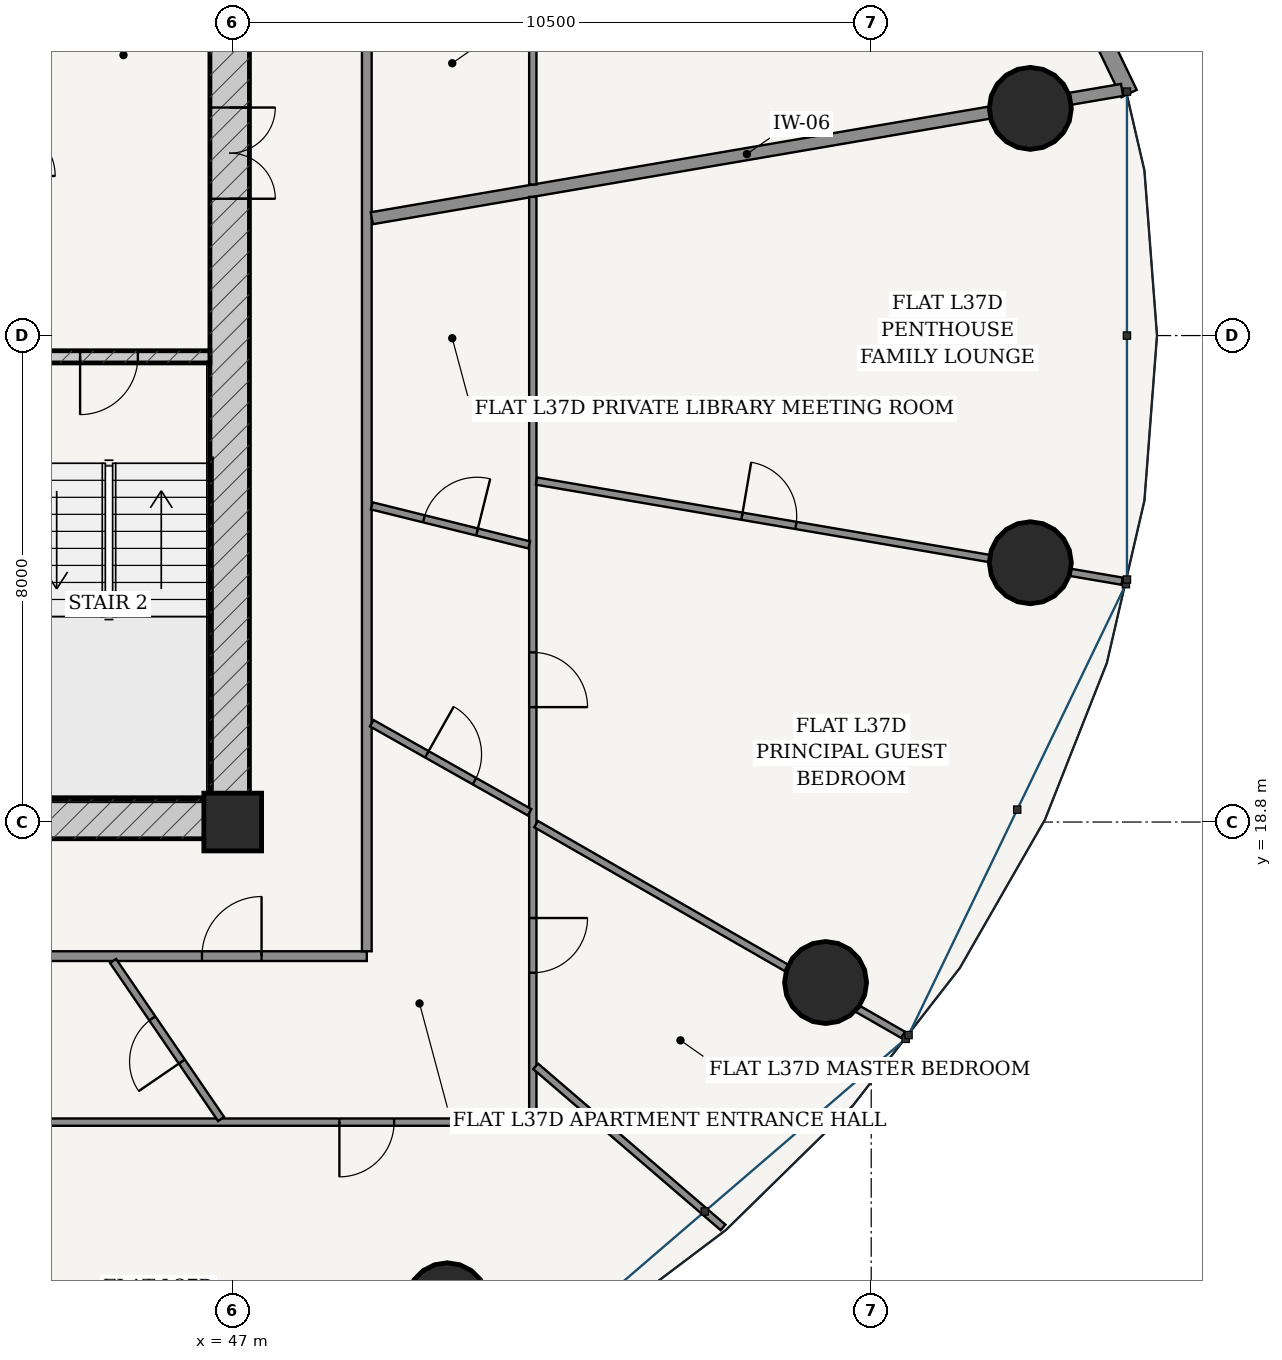
"""IFC4 building model, lengths in metres.
Left out: names, types, materials, properties, quantities, classifications, styles, units other than length and angle.
Written with IfcOpenShell. Run it as: python <this file> out.ifc"""

import sys

from ifc_helpers import new_model, si_unit, direction, frame, frame_2d, origin, origin_2d, place, context, subcontext, project, spatial, rectangle, hollow_circle, extrude, source, transform, mapped, element, fill, save


model = new_model("IFC4")
c1 = context("Model", 3, precision=1e-05, world=origin(), true_north=direction((-0.2419218956, 0.970295726276)))
c2 = subcontext(c1, "Body", "Model", "MODEL_VIEW")
j1 = project(units=[si_unit("LENGTHUNIT", "METRE"), si_unit("PLANEANGLEUNIT", "RADIAN")], contexts=[c1])
p1 = place(None, origin())
s1 = spatial("IfcSite", under=j1, at=p1, CompositionType="ELEMENT")
p2 = place(p1, origin())
s2 = spatial("IfcBuilding", under=s1, at=p2, CompositionType="ELEMENT")
p3 = place(p2, frame((0.0, 0.0, 142.6)))
s3 = spatial("IfcBuildingStorey", under=s2, at=p3, CompositionType="ELEMENT", Elevation=142.6)
p4 = place(p3, frame((47.0, 18.8, 0.0), z_axis=(0.0, 0.0, 1.0), x_axis=(1.0, 0.0, 0.0)))
e1 = element("IfcColumn", 1, at=p4, inside=s3, PredefinedType="COLUMN", context=c2, shape_type="SweptSolid", body=[
    extrude(rectangle(XDim=0.95, YDim=0.95, at=origin_2d()), origin(), (0.0, 0.0, 1.0), 3.6),
])
p5 = place(p3, frame((28.725, 18.85, 0.0), z_axis=(0.0, 0.0, 1.0), x_axis=(1.0, 0.0, 0.0)))
e2 = element("IfcWall", 2, at=p5, inside=s3, PredefinedType="SHEAR", context=c2, shape_type="SweptSolid", body=[
    extrude(rectangle(XDim=18.55, YDim=0.65, at=frame_2d((9.275, 0.0))), origin(), (0.0, 0.0, 1.0), 3.33),
])
p6 = place(p5, frame((6.81, 0.0, 0.0)))
e3 = element("IfcOpeningElement", 3, at=p6, cuts=e2, PredefinedType="OPENING", context=c2, shape_type="SweptSolid", body=[
    extrude(rectangle(XDim=0.85, YDim=2.1, at=frame_2d((0.425, 1.05))), frame((0.0, 0.335, 0.0), z_axis=(0.0, -1.0, 0.0), x_axis=(1.0, 0.0, 0.0)), (0.0, 0.0, 1.0), 0.67),
])
p7 = place(p5, frame((8.85, 0.0, 0.0)))
e4 = element("IfcOpeningElement", 4, at=p7, cuts=e2, PredefinedType="OPENING", context=c2, shape_type="SweptSolid", body=[
    extrude(rectangle(XDim=0.85, YDim=2.1, at=frame_2d((0.425, 1.05))), frame((0.0, 0.335, 0.0), z_axis=(0.0, -1.0, 0.0), x_axis=(1.0, 0.0, 0.0)), (0.0, 0.0, 1.0), 0.67),
])
p8 = place(p5, frame((10.89, 0.0, 0.0)))
e5 = element("IfcOpeningElement", 5, at=p8, cuts=e2, PredefinedType="OPENING", context=c2, shape_type="SweptSolid", body=[
    extrude(rectangle(XDim=0.85, YDim=2.1, at=frame_2d((0.425, 1.05))), frame((0.0, 0.335, 0.0), z_axis=(0.0, -1.0, 0.0), x_axis=(1.0, 0.0, 0.0)), (0.0, 0.0, 1.0), 0.67),
])
p9 = place(p3, frame((46.95, 19.175, 0.0), z_axis=(0.0, 0.0, 1.0), x_axis=(0.0, 1.0, 0.0)))
e6 = element("IfcWall", 6, at=p9, inside=s3, PredefinedType="SHEAR", context=c2, shape_type="SweptSolid", body=[
    extrude(rectangle(XDim=15.25, YDim=0.65, at=frame_2d((7.625, 0.0))), origin(), (0.0, 0.0, 1.0), 3.33),
])
p10 = place(p9, frame((9.875, 0.0, 0.0)))
e7 = element("IfcOpeningElement", 7, at=p10, cuts=e6, PredefinedType="OPENING", context=c2, shape_type="SweptSolid", body=[
    extrude(rectangle(XDim=1.5, YDim=2.2, at=frame_2d((0.75, 1.1))), frame((0.0, 0.335, 0.0), z_axis=(0.0, -1.0, 0.0), x_axis=(1.0, 0.0, 0.0)), (0.0, 0.0, 1.0), 0.67),
])
p11 = place(p3, frame((43.305, 26.45, 0.0), z_axis=(0.0, 0.0, 1.0), x_axis=(1.0, 0.0, 0.0)))
e8 = element("IfcWall", 8, at=p11, inside=s3, PredefinedType="SOLIDWALL", context=c2, shape_type="SweptSolid", body=[
    extrude(rectangle(XDim=3.32, YDim=0.2, at=frame_2d((1.66, 0.0))), origin(), (0.0, 0.0, 1.0), 3.33),
])
p12 = place(p11, frame((1.185, 0.0, 0.0)))
e9 = element("IfcOpeningElement", 9, at=p12, cuts=e8, PredefinedType="OPENING", context=c2, shape_type="SweptSolid", body=[
    extrude(rectangle(XDim=0.95, YDim=2.15, at=frame_2d((0.475, 1.075))), frame((0.0, 0.11, 0.0), z_axis=(0.0, -1.0, 0.0), x_axis=(1.0, 0.0, 0.0)), (0.0, 0.0, 1.0), 0.22),
])
for number, where, z_axis, x_axis in (
    (10, (60.117, 30.536, 0.0), (0.0, 0.0, 1.0), (1.0, 0.0, 0.0)),
    (11, (50.528, 10.877, 0.0), (0.0, 0.0, 1.0), (1.0, 0.0, 0.0)),
    (12, (56.75, 16.161, 0.0), (0.0, 0.0, 1.0), (1.0, 0.0, 0.0)),
    (13, (60.117, 23.064, 0.0), (0.0, 0.0, 1.0), (1.0, 0.0, 0.0)),
):
    element("IfcColumn", number, at=place(p3, frame(where, z_axis=z_axis, x_axis=x_axis)), inside=s3, PredefinedType="COLUMN", context=c2, shape_type="SweptSolid", body=[
        extrude(hollow_circle(Radius=0.675, WallThickness=0.042, at=origin_2d()), origin(), (0.0, 0.0, 1.0), 3.6),
    ])
p13 = place(p3, frame((61.74, 30.78, 0.0), z_axis=(0.0, 0.0, 1.0), x_axis=(-0.434209827226, 0.900811759437, 0.0)))
e14 = element("IfcWall", 14, at=p13, inside=s3, PredefinedType="SOLIDWALL", context=c2, shape_type="SweptSolid", body=[
    extrude(rectangle(XDim=8.472, YDim=0.28, at=frame_2d((4.236, 0.0))), origin(), (0.0, 0.0, 1.0), 3.33),
])
p14 = place(p13, frame((1.237, 0.0, 0.85)))
e15 = element("IfcOpeningElement", 15, at=p14, cuts=e14, PredefinedType="OPENING", context=c2, shape_type="SweptSolid", body=[
    extrude(rectangle(XDim=2.1, YDim=1.95, at=frame_2d((1.05, 0.975))), frame((0.0, 0.15, 0.0), z_axis=(0.0, -1.0, 0.0), x_axis=(1.0, 0.0, 0.0)), (0.0, 0.0, 1.0), 0.3),
])
p15 = place(p13, frame((5.134, 0.0, 0.85)))
e16 = element("IfcOpeningElement", 16, at=p15, cuts=e14, PredefinedType="OPENING", context=c2, shape_type="SweptSolid", body=[
    extrude(rectangle(XDim=2.1, YDim=1.95, at=frame_2d((1.05, 0.975))), frame((0.0, 0.15, 0.0), z_axis=(0.0, -1.0, 0.0), x_axis=(1.0, 0.0, 0.0)), (0.0, 0.0, 1.0), 0.3),
])
p16 = place(p3, frame((34.32, 16.595, 0.0), z_axis=(0.0, 0.0, 1.0), x_axis=(1.0, 0.0, 0.0)))
e17 = element("IfcWall", 17, at=p16, inside=s3, PredefinedType="PARTITIONING", context=c2, shape_type="SweptSolid", body=[
    extrude(rectangle(XDim=14.885, YDim=0.16, at=frame_2d((7.442, 0.0))), origin(), (0.0, 0.0, 1.0), 2.776),
])
p17 = place(p16, frame((12.174, 0.0, 0.0)))
e18 = element("IfcOpeningElement", 18, at=p17, cuts=e17, PredefinedType="OPENING", context=c2, shape_type="SweptSolid", body=[
    extrude(rectangle(XDim=0.98, YDim=2.2, at=frame_2d((0.49, 1.1))), frame((0.0, 0.09, 0.0), z_axis=(0.0, -1.0, 0.0), x_axis=(1.0, 0.0, 0.0)), (0.0, 0.0, 1.0), 0.18),
])
p18 = place(p3, frame((49.205, 16.675, 0.0), z_axis=(0.0, 0.0, 1.0), x_axis=(0.0, 1.0, 0.0)))
e19 = element("IfcWall", 19, at=p18, inside=s3, PredefinedType="PARTITIONING", context=c2, shape_type="SweptSolid", body=[
    extrude(rectangle(XDim=18.4, YDim=0.16, at=frame_2d((9.2, 0.0))), origin(), (0.0, 0.0, 1.0), 2.776),
])
p19 = place(p3, frame((49.287, 28.73, 0.0), z_axis=(0.0, 0.0, 1.0), x_axis=(0.985698993845, 0.168515558725, 0.0)))
e20 = element("IfcWall", 20, at=p19, inside=s3, PredefinedType="PARTITIONING", context=c2, shape_type="SweptSolid", body=[
    extrude(rectangle(XDim=12.517, YDim=0.2, at=frame_2d((6.259, 0.0))), origin(), (0.0, 0.0, 1.0), 2.776),
])
p20 = place(p3, frame((51.935, 37.885, 0.0), z_axis=(0.0, 0.0, 1.0), x_axis=(0.0, -1.0, 0.0)))
e21 = element("IfcWall", 21, at=p20, inside=s3, PredefinedType="PARTITIONING", context=c2, shape_type="SweptSolid", body=[
    extrude(rectangle(XDim=8.601, YDim=0.12, at=frame_2d((4.3, 0.0))), origin(), (0.0, 0.0, 1.0), 2.776),
])
p21 = place(p20, frame((1.021, 0.0, 0.0)))
e22 = element("IfcOpeningElement", 22, at=p21, cuts=e21, PredefinedType="OPENING", context=c2, shape_type="SweptSolid", body=[
    extrude(rectangle(XDim=0.9, YDim=2.15, at=frame_2d((0.45, 1.075))), frame((0.0, 0.07, 0.0), z_axis=(0.0, -1.0, 0.0), x_axis=(1.0, 0.0, 0.0)), (0.0, 0.0, 1.0), 0.14),
])
p22 = place(p3, frame((51.935, 29.08, 0.0), z_axis=(0.0, 0.0, 1.0), x_axis=(0.0, -1.0, 0.0)))
e23 = element("IfcWall", 23, at=p22, inside=s3, PredefinedType="PARTITIONING", context=c2, shape_type="SweptSolid", body=[
    extrude(rectangle(XDim=15.215, YDim=0.12, at=frame_2d((7.608, 0.0))), origin(), (0.0, 0.0, 1.0), 2.776),
])
p23 = place(p22, frame((11.859, 0.0, 0.0)))
e24 = element("IfcOpeningElement", 24, at=p23, cuts=e23, PredefinedType="OPENING", context=c2, shape_type="SweptSolid", body=[
    extrude(rectangle(XDim=0.9, YDim=2.15, at=frame_2d((0.45, 1.075))), frame((0.0, 0.07, 0.0), z_axis=(0.0, -1.0, 0.0), x_axis=(1.0, 0.0, 0.0)), (0.0, 0.0, 1.0), 0.14),
])
p24 = place(p22, frame((7.49, 0.0, 0.0)))
e25 = element("IfcOpeningElement", 25, at=p24, cuts=e23, PredefinedType="OPENING", context=c2, shape_type="SweptSolid", body=[
    extrude(rectangle(XDim=0.9, YDim=2.15, at=frame_2d((0.45, 1.075))), frame((0.0, 0.07, 0.0), z_axis=(0.0, -1.0, 0.0), x_axis=(1.0, 0.0, 0.0)), (0.0, 0.0, 1.0), 0.14),
])
p25 = place(p3, frame((51.935, 13.865, 0.0), z_axis=(0.0, 0.0, 1.0), x_axis=(-1.0, 0.0, 0.0)))
e26 = element("IfcWall", 26, at=p25, inside=s3, PredefinedType="PARTITIONING", context=c2, shape_type="SweptSolid", body=[
    extrude(rectangle(XDim=10.84, YDim=0.12, at=frame_2d((5.42, 0.0))), origin(), (0.0, 0.0, 1.0), 2.776),
])
p26 = place(p25, frame((2.281, 0.0, 0.0)))
e27 = element("IfcOpeningElement", 27, at=p26, cuts=e26, PredefinedType="OPENING", context=c2, shape_type="SweptSolid", body=[
    extrude(rectangle(XDim=0.9, YDim=2.15, at=frame_2d((0.45, 1.075))), frame((0.0, 0.07, 0.0), z_axis=(0.0, -1.0, 0.0), x_axis=(1.0, 0.0, 0.0)), (0.0, 0.0, 1.0), 0.14),
])
p27 = place(p3, frame((51.982, 14.782, 0.0), z_axis=(0.0, 0.0, 1.0), x_axis=(0.758356837469, -0.651839632935, 0.0)))
e28 = element("IfcWall", 28, at=p27, inside=s3, PredefinedType="PARTITIONING", context=c2, shape_type="SweptSolid", body=[
    extrude(rectangle(XDim=4.064, YDim=0.12, at=frame_2d((2.032, 0.0))), origin(), (0.0, 0.0, 1.0), 2.846),
])
p28 = place(p3, frame((51.989, 18.766, 0.0), z_axis=(0.0, 0.0, 1.0), x_axis=(0.86717064002, -0.498011125466, 0.0)))
e29 = element("IfcWall", 29, at=p28, inside=s3, PredefinedType="PARTITIONING", context=c2, shape_type="SweptSolid", body=[
    extrude(rectangle(XDim=6.961, YDim=0.12, at=frame_2d((3.48, 0.0))), origin(), (0.0, 0.0, 1.0), 2.776),
])
p29 = place(p3, frame((51.996, 24.407, 0.0), z_axis=(0.0, 0.0, 1.0), x_axis=(0.985698378271, -0.168519159369, 0.0)))
e30 = element("IfcWall", 30, at=p29, inside=s3, PredefinedType="PARTITIONING", context=c2, shape_type="SweptSolid", body=[
    extrude(rectangle(XDim=9.769, YDim=0.12, at=frame_2d((4.884, 0.0))), origin(), (0.0, 0.0, 1.0), 2.776),
])
p30 = place(p29, frame((3.428, 0.0, 0.0)))
e31 = element("IfcOpeningElement", 31, at=p30, cuts=e30, PredefinedType="OPENING", context=c2, shape_type="SweptSolid", body=[
    extrude(rectangle(XDim=0.9, YDim=2.15, at=frame_2d((0.45, 1.075))), frame((0.0, 0.07, 0.0), z_axis=(0.0, -1.0, 0.0), x_axis=(1.0, 0.0, 0.0)), (0.0, 0.0, 1.0), 0.14),
])
p31 = place(p3, frame((45.032, 16.515, 0.0), z_axis=(0.0, 0.0, 1.0), x_axis=(0.564486512722, -0.825442291717, 0.0)))
e32 = element("IfcWall", 32, at=p31, inside=s3, PredefinedType="PARTITIONING", context=c2, shape_type="SweptSolid", body=[
    extrude(rectangle(XDim=3.148, YDim=0.12, at=frame_2d((1.574, 0.0))), origin(), (0.0, 0.0, 1.0), 3.005),
])
p32 = place(p31, frame((1.144, 0.0, 0.0)))
e33 = element("IfcOpeningElement", 33, at=p32, cuts=e32, PredefinedType="OPENING", context=c2, shape_type="SweptSolid", body=[
    extrude(rectangle(XDim=0.86, YDim=2.15, at=frame_2d((0.43, 1.075))), frame((0.0, 0.07, 0.0), z_axis=(0.0, -1.0, 0.0), x_axis=(1.0, 0.0, 0.0)), (0.0, 0.0, 1.0), 0.14),
])
p33 = place(p3, frame((49.287, 20.426, 0.0), z_axis=(0.0, 0.0, 1.0), x_axis=(0.870723023576, -0.491773744942, 0.0)))
e34 = element("IfcWall", 34, at=p33, inside=s3, PredefinedType="PARTITIONING", context=c2, shape_type="SweptSolid", body=[
    extrude(rectangle(XDim=2.98, YDim=0.12, at=frame_2d((1.49, 0.0))), origin(), (0.0, 0.0, 1.0), 2.776),
])
p34 = place(p33, frame((1.04, 0.0, 0.0)))
e35 = element("IfcOpeningElement", 35, at=p34, cuts=e34, PredefinedType="OPENING", context=c2, shape_type="SweptSolid", body=[
    extrude(rectangle(XDim=0.9, YDim=2.15, at=frame_2d((0.45, 1.075))), frame((0.0, 0.07, 0.0), z_axis=(0.0, -1.0, 0.0), x_axis=(1.0, 0.0, 0.0)), (0.0, 0.0, 1.0), 0.14),
])
p35 = place(p3, frame((49.287, 23.999, 0.0), z_axis=(0.0, 0.0, 1.0), x_axis=(0.970571855633, -0.240811696256, 0.0)))
e36 = element("IfcWall", 36, at=p35, inside=s3, PredefinedType="PARTITIONING", context=c2, shape_type="SweptSolid", body=[
    extrude(rectangle(XDim=2.666, YDim=0.12, at=frame_2d((1.333, 0.0))), origin(), (0.0, 0.0, 1.0), 3.33),
])
p36 = place(p35, frame((0.883, 0.0, 0.0)))
e37 = element("IfcOpeningElement", 37, at=p36, cuts=e36, PredefinedType="OPENING", context=c2, shape_type="SweptSolid", body=[
    extrude(rectangle(XDim=0.9, YDim=2.15, at=frame_2d((0.45, 1.075))), frame((0.0, 0.07, 0.0), z_axis=(0.0, -1.0, 0.0), x_axis=(1.0, 0.0, 0.0)), (0.0, 0.0, 1.0), 0.14),
])
m1 = source(origin(), c2, "Body", "SweptSolid", [
    extrude(rectangle(XDim=1.5, YDim=2.2, at=frame_2d((0.75, 1.1))), frame((0.0, 0.025, 0.0), z_axis=(0.0, -1.0, 0.0), x_axis=(1.0, 0.0, 0.0)), (0.0, 0.0, 1.0), 0.05),
])
p37 = place(p10, frame((1.5, 0.0, 0.0), z_axis=(0.0, 0.0, 1.0), x_axis=(-1.0, 0.0, 0.0)))
e38 = element("IfcDoor", 38, at=p37, inside=s3, OperationType="DOUBLE_DOOR_SINGLE_SWING", PredefinedType="DOOR", context=c2, shape_type="MappedRepresentation", body=[
    mapped(m1, transform((0.0, 0.0, 0.0), scale=1.0)),
])
fill(e7, e38)
m2 = source(origin(), c2, "Body", "SweptSolid", [
    extrude(rectangle(XDim=0.95, YDim=2.15, at=frame_2d((0.475, 1.075))), frame((0.0, 0.025, 0.0), z_axis=(0.0, -1.0, 0.0), x_axis=(1.0, 0.0, 0.0)), (0.0, 0.0, 1.0), 0.05),
])
p38 = place(p12, frame((0.95, 0.0, 0.0), z_axis=(0.0, 0.0, 1.0), x_axis=(-1.0, 0.0, 0.0)))
e39 = element("IfcDoor", 39, at=p38, inside=s3, OperationType="SINGLE_SWING_RIGHT", PredefinedType="DOOR", context=c2, shape_type="MappedRepresentation", body=[
    mapped(m2, transform((0.0, 0.0, 0.0), scale=1.0)),
])
fill(e9, e39)
m3 = source(origin(), c2, "Body", "SweptSolid", [
    extrude(rectangle(XDim=0.98, YDim=2.2, at=frame_2d((0.49, 1.1))), frame((0.0, 0.025, 0.0), z_axis=(0.0, -1.0, 0.0), x_axis=(1.0, 0.0, 0.0)), (0.0, 0.0, 1.0), 0.05),
])
p39 = place(p17, origin())
e40 = element("IfcDoor", 40, at=p39, inside=s3, OperationType="SINGLE_SWING_RIGHT", PredefinedType="DOOR", context=c2, shape_type="MappedRepresentation", body=[
    mapped(m3, transform((0.0, 0.0, 0.0), scale=1.0)),
])
fill(e18, e40)
m4 = source(origin(), c2, "Body", "SweptSolid", [
    extrude(rectangle(XDim=0.86, YDim=2.15, at=frame_2d((0.43, 1.075))), frame((0.0, 0.025, 0.0), z_axis=(0.0, -1.0, 0.0), x_axis=(1.0, 0.0, 0.0)), (0.0, 0.0, 1.0), 0.05),
])
p40 = place(p32, frame((0.86, 0.0, 0.0), z_axis=(0.0, 0.0, 1.0), x_axis=(-1.0, 0.0, 0.0)))
e41 = element("IfcDoor", 41, at=p40, inside=s3, OperationType="SINGLE_SWING_LEFT", PredefinedType="DOOR", context=c2, shape_type="MappedRepresentation", body=[
    mapped(m4, transform((0.0, 0.0, 0.0), scale=1.0)),
])
fill(e33, e41)
m5 = source(origin(), c2, "Body", "SweptSolid", [
    extrude(rectangle(XDim=0.9, YDim=2.15, at=frame_2d((0.45, 1.075))), frame((0.0, 0.025, 0.0), z_axis=(0.0, -1.0, 0.0), x_axis=(1.0, 0.0, 0.0)), (0.0, 0.0, 1.0), 0.05),
])
p41 = place(p26, origin())
e42 = element("IfcDoor", 42, at=p41, inside=s3, OperationType="SINGLE_SWING_RIGHT", PredefinedType="DOOR", context=c2, shape_type="MappedRepresentation", body=[
    mapped(m5, transform((0.0, 0.0, 0.0), scale=1.0)),
])
fill(e27, e42)
p42 = place(p34, origin())
e43 = element("IfcDoor", 43, at=p42, inside=s3, OperationType="SINGLE_SWING_LEFT", PredefinedType="DOOR", context=c2, shape_type="MappedRepresentation", body=[
    mapped(m5, transform((0.0, 0.0, 0.0), scale=1.0)),
])
fill(e35, e43)
p43 = place(p36, origin())
e44 = element("IfcDoor", 44, at=p43, inside=s3, OperationType="SINGLE_SWING_RIGHT", PredefinedType="DOOR", context=c2, shape_type="MappedRepresentation", body=[
    mapped(m5, transform((0.0, 0.0, 0.0), scale=1.0)),
])
fill(e37, e44)
p44 = place(p23, origin())
e45 = element("IfcDoor", 45, at=p44, inside=s3, OperationType="SINGLE_SWING_LEFT", PredefinedType="DOOR", context=c2, shape_type="MappedRepresentation", body=[
    mapped(m5, transform((0.0, 0.0, 0.0), scale=1.0)),
])
fill(e24, e45)
p45 = place(p24, origin())
e46 = element("IfcDoor", 46, at=p45, inside=s3, OperationType="SINGLE_SWING_RIGHT", PredefinedType="DOOR", context=c2, shape_type="MappedRepresentation", body=[
    mapped(m5, transform((0.0, 0.0, 0.0), scale=1.0)),
])
fill(e25, e46)
p46 = place(p30, origin())
e47 = element("IfcDoor", 47, at=p46, inside=s3, OperationType="SINGLE_SWING_LEFT", PredefinedType="DOOR", context=c2, shape_type="MappedRepresentation", body=[
    mapped(m5, transform((0.0, 0.0, 0.0), scale=1.0)),
])
fill(e31, e47)
save(model, sys.argv[1])
